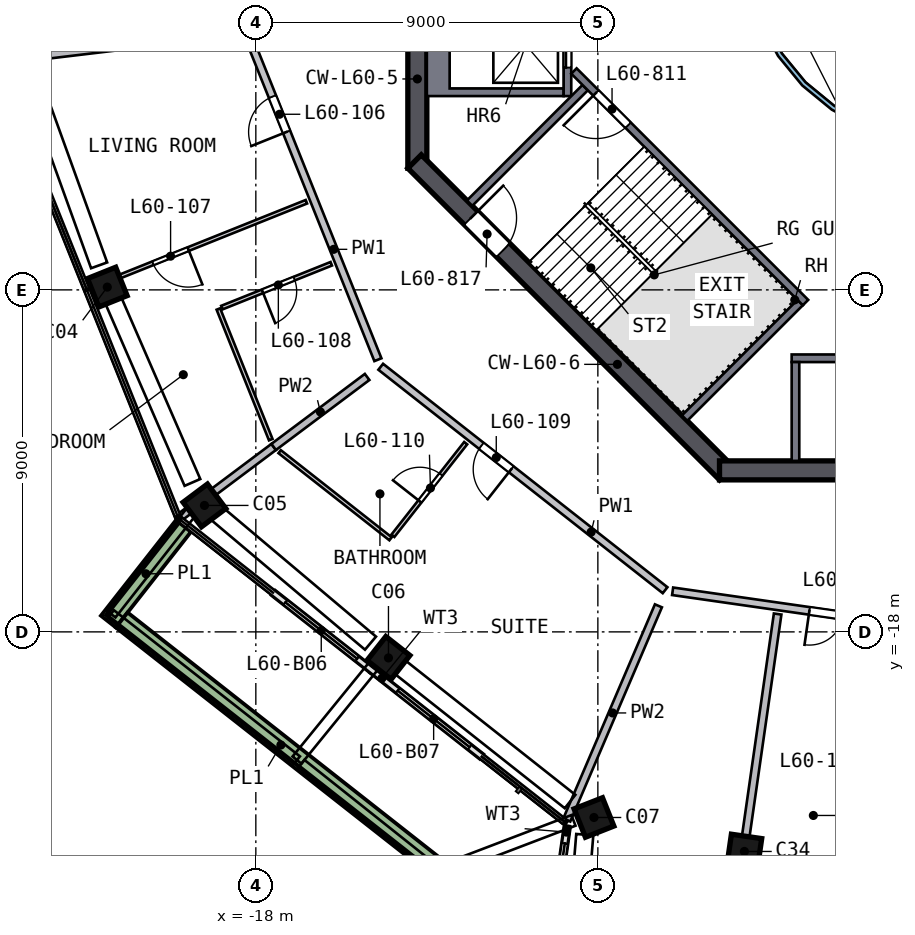
"""IFC4 building model, lengths in metres.
Left out: names, types, materials, properties, quantities, classifications, styles, units other than length and angle.
Written with IfcOpenShell. Run it as: python <this file> out.ifc"""

import sys

from ifc_helpers import new_model, si_unit, direction, frame, frame_2d, origin, origin_2d, place, context, subcontext, project, spatial, polyline, rectangle, outline, extrude, element, fill, save


model = new_model("IFC4")
c1 = context("Model", 3, precision=1e-05, world=origin(), true_north=direction((0.0, 1.0)))
c2 = subcontext(c1, "Body", "Model", "MODEL_VIEW")
j1 = project(units=[si_unit("LENGTHUNIT", "METRE"), si_unit("PLANEANGLEUNIT", "RADIAN")], contexts=[c1])
p1 = place(None, origin())
s1 = spatial("IfcSite", under=j1, at=p1, CompositionType="ELEMENT")
p2 = place(p1, origin())
s2 = spatial("IfcBuilding", under=s1, at=p2, CompositionType="ELEMENT")
p3 = place(p2, frame((0.0, 0.0, 244.5)))
s3 = spatial("IfcBuildingStorey", under=s2, at=p3, CompositionType="ELEMENT", Elevation=244.5)
p4 = place(p3, frame((-21.96, -8.801, 0.0), z_axis=(0.042739143, -0.104110118, 0.993647044), x_axis=(0.369538016, -0.922375739, -0.11253733)))
e1 = element("IfcColumn", 1, at=p4, inside=s3, PredefinedType="COLUMN", context=c2, shape_type="SweptSolid", body=[
    extrude(rectangle(XDim=0.8, YDim=0.8, at=origin_2d()), origin(), (0.0, 0.0, 1.0), 3.21),
])
p5 = place(p3, frame((-19.436, -14.561, 0.0), z_axis=(0.070016696, -0.091835145, 0.993309604), x_axis=(-0.595516736, 0.794999833, 0.11547763)))
e2 = element("IfcColumn", 2, at=p5, inside=s3, PredefinedType="COLUMN", context=c2, shape_type="SweptSolid", body=[
    extrude(rectangle(XDim=0.8, YDim=0.8, at=origin_2d()), origin(), (0.0, 0.0, 1.0), 3.211),
])
p6 = place(p3, frame((-14.617, -18.602, 0.0), z_axis=(0.089052954, -0.068747968, 0.993651492), x_axis=(0.781361755, -0.613855028, -0.112498053)))
e3 = element("IfcColumn", 3, at=p6, inside=s3, PredefinedType="COLUMN", context=c2, shape_type="SweptSolid", body=[
    extrude(rectangle(XDim=0.8, YDim=0.8, at=origin_2d()), origin(), (0.0, 0.0, 1.0), 3.21),
])
p7 = place(p3, frame((-9.234, -22.833, 0.0), z_axis=(0.108919678, -0.042944605, 0.993122482), x_axis=(-0.364795572, 0.92763396, 0.080121326)))
e4 = element("IfcColumn", 4, at=p7, inside=s3, PredefinedType="COLUMN", context=c2, shape_type="SweptSolid", body=[
    extrude(rectangle(XDim=0.8, YDim=0.8, at=origin_2d()), origin(), (0.0, 0.0, 1.0), 3.212),
])
p8 = place(p3, frame((-5.281, -23.749, 0.0), z_axis=(0.113118899, -0.024174603, 0.993287322), x_axis=(-0.142952764, -0.989698718, -0.007807323)))
e5 = element("IfcColumn", 5, at=p8, inside=s3, PredefinedType="COLUMN", context=c2, shape_type="SweptSolid", body=[
    extrude(rectangle(XDim=0.8, YDim=0.8, at=origin_2d()), origin(), (0.0, 0.0, 1.0), 3.211),
])
p9 = place(p3, frame((-13.75, 5.799, 0.0), z_axis=(0.0, 0.0, 1.0), x_axis=(0.0, -1.0, 0.0)))
e6 = element("IfcWall", 6, at=p9, inside=s3, PredefinedType="SHEAR", context=c2, shape_type="SweptSolid", body=[
    extrude(rectangle(XDim=11.598, YDim=0.5, at=frame_2d((5.799, 0.0))), origin(), (0.0, 0.0, 1.0), 3.5),
])
p10 = place(p9, frame((4.899, 0.0, 0.0)))
e7 = element("IfcOpeningElement", 7, at=p10, cuts=e6, PredefinedType="OPENING", context=c2, shape_type="SweptSolid", body=[
    extrude(rectangle(XDim=1.8, YDim=2.1, at=frame_2d((0.9, 1.05))), frame((0.0, 0.26, 0.0), z_axis=(0.0, -1.0, 0.0), x_axis=(1.0, 0.0, 0.0)), (0.0, 0.0, 1.0), 0.52),
])
p11 = place(p3, frame((-13.823, -5.622, 0.0), z_axis=(0.0, 0.0, 1.0), x_axis=(0.707106781, -0.707106781, 0.0)))
e8 = element("IfcWall", 8, at=p11, inside=s3, PredefinedType="SHEAR", context=c2, shape_type="SweptSolid", body=[
    extrude(rectangle(XDim=11.598, YDim=0.5, at=frame_2d((5.799, 0.0))), origin(), (0.0, 0.0, 1.0), 3.5),
])
p12 = place(p11, frame((2.099, 0.0, 0.0)))
e9 = element("IfcOpeningElement", 9, at=p12, cuts=e8, PredefinedType="OPENING", context=c2, shape_type="SweptSolid", body=[
    extrude(rectangle(XDim=1.2, YDim=2.1, at=frame_2d((0.6, 1.05))), frame((0.0, 0.26, 0.0), z_axis=(0.0, -1.0, 0.0), x_axis=(1.0, 0.0, 0.0)), (0.0, 0.0, 1.0), 0.52),
])
p13 = place(p3, frame((-5.799, -13.75, 0.0), z_axis=(0.0, 0.0, 1.0), x_axis=(1.0, 0.0, 0.0)))
e10 = element("IfcWall", 10, at=p13, inside=s3, PredefinedType="SHEAR", context=c2, shape_type="SweptSolid", body=[
    extrude(rectangle(XDim=11.598, YDim=0.5, at=frame_2d((5.799, 0.0))), origin(), (0.0, 0.0, 1.0), 3.5),
])
p14 = place(p3, frame((-17.537, -16.976, 0.0), z_axis=(0.0, 0.0, 1.0), x_axis=(0.786266993, -0.617886896, 0.0)))
e11 = element("IfcWall", 11, at=p14, inside=s3, PredefinedType="SOLIDWALL", context=c2, shape_type="SweptSolid", body=[
    extrude(rectangle(XDim=3.3, YDim=0.15, at=frame_2d((1.65, 0.0))), origin(), (0.0, 0.0, 1.0), 2.525),
])
p15 = place(p14, frame((0.4, 0.0, 0.0)))
e12 = element("IfcOpeningElement", 12, at=p15, cuts=e11, PredefinedType="OPENING", context=c2, shape_type="SweptSolid", body=[
    extrude(rectangle(XDim=2.4, YDim=2.4, at=frame_2d((1.2, 1.2))), frame((0.0, 0.085, 0.0), z_axis=(0.0, -1.0, 0.0), x_axis=(1.0, 0.0, 0.0)), (0.0, 0.0, 1.0), 0.17),
])
p16 = place(p3, frame((-14.942, -19.015, 0.0), z_axis=(0.0, 0.0, 1.0), x_axis=(0.786290572, -0.61785689, 0.0)))
e13 = element("IfcWall", 13, at=p16, inside=s3, PredefinedType="SOLIDWALL", context=c2, shape_type="SweptSolid", body=[
    extrude(rectangle(XDim=3.661, YDim=0.15, at=frame_2d((1.831, 0.0))), origin(), (0.0, 0.0, 1.0), 2.525),
])
p17 = place(p16, frame((0.861, 0.0, 0.0)))
e14 = element("IfcOpeningElement", 14, at=p17, cuts=e13, PredefinedType="OPENING", context=c2, shape_type="SweptSolid", body=[
    extrude(rectangle(XDim=2.4, YDim=2.4, at=frame_2d((1.2, 1.2))), frame((0.0, 0.085, 0.0), z_axis=(0.0, -1.0, 0.0), x_axis=(1.0, 0.0, 0.0)), (0.0, 0.0, 1.0), 0.17),
])
p18 = place(p3, frame((-9.813, -23.17, 0.0), z_axis=(0.0, 0.0, 1.0), x_axis=(-0.141987452, -0.989868458, 0.0)))
e15 = element("IfcWall", 15, at=p18, inside=s3, PredefinedType="SOLIDWALL", context=c2, shape_type="SweptSolid", body=[
    extrude(rectangle(XDim=3.2, YDim=0.15, at=frame_2d((1.6, 0.0))), origin(), (0.0, 0.0, 1.0), 2.525),
])
p19 = place(p18, frame((0.4, 0.0, 0.0)))
e16 = element("IfcOpeningElement", 16, at=p19, cuts=e15, PredefinedType="OPENING", context=c2, shape_type="SweptSolid", body=[
    extrude(rectangle(XDim=2.4, YDim=2.4, at=frame_2d((1.2, 1.2))), frame((0.0, 0.085, 0.0), z_axis=(0.0, -1.0, 0.0), x_axis=(1.0, 0.0, 0.0)), (0.0, 0.0, 1.0), 0.17),
])
p20 = place(p3, frame((-19.903, -15.213, 0.0), z_axis=(0.0, 0.0, 1.0), x_axis=(-0.617858626, -0.786289208, 0.0)))
e17 = element("IfcWall", 17, at=p20, inside=s3, PredefinedType="SOLIDWALL", context=c2, shape_type="SweptSolid", body=[
    extrude(rectangle(XDim=3.199, YDim=0.5, at=frame_2d((1.6, 0.0))), origin(), (0.0, 0.0, 1.0), 0.7),
])
p21 = place(p3, frame((-21.529, -17.687, 0.0), z_axis=(0.0, 0.0, 1.0), x_axis=(0.786290502, -0.617856979, 0.0)))
e18 = element("IfcWall", 18, at=p21, inside=s3, PredefinedType="SOLIDWALL", context=c2, shape_type="SweptSolid", body=[
    extrude(rectangle(XDim=10.652, YDim=0.5, at=frame_2d((5.326, 0.0))), origin(), (0.0, 0.0, 1.0), 0.7),
])
p22 = place(p3, origin())
e19 = element("IfcWall", 19, at=p22, inside=s3, PredefinedType="SOLIDWALL", context=c2, shape_type="SweptSolid", body=[
    extrude(outline(polyline([(-13.5, -3.9), (-13.5, -1.2), (-9.9, -1.2), (-9.9, -1.4), (-12.9, -1.4), (-12.9, -3.7), (-9.9, -3.7), (-9.9, -3.9), (-13.5, -3.9)])), origin(), (0.0, 0.0, 1.0), 3.19),
])
p23 = place(p3, frame((-9.8, -1.2, 0.0), z_axis=(0.0, 0.0, 1.0), x_axis=(0.0, -1.0, 0.0)))
e20 = element("IfcWall", 20, at=p23, inside=s3, PredefinedType="SOLIDWALL", context=c2, shape_type="SweptSolid", body=[
    extrude(rectangle(XDim=2.7, YDim=0.2, at=frame_2d((1.35, 0.0))), origin(), (0.0, 0.0, 1.0), 3.19),
])
p24 = place(p23, frame((0.75, 0.0, 0.0)))
e21 = element("IfcOpeningElement", 21, at=p24, cuts=e20, PredefinedType="OPENING", context=c2, shape_type="SweptSolid", body=[
    extrude(rectangle(XDim=1.2, YDim=2.1, at=frame_2d((0.6, 1.05))), frame((0.0, 0.11, 0.0), z_axis=(0.0, -1.0, 0.0), x_axis=(1.0, 0.0, 0.0)), (0.0, 0.0, 1.0), 0.22),
])
p25 = place(p3, frame((-3.9, -10.8, 0.0), z_axis=(0.0, 0.0, 1.0), x_axis=(1.0, 0.0, 0.0)))
e22 = element("IfcWall", 22, at=p25, inside=s3, PredefinedType="SOLIDWALL", context=c2, shape_type="SweptSolid", body=[
    extrude(rectangle(XDim=7.8, YDim=0.2, at=frame_2d((3.9, 0.0))), origin(), (0.0, 0.0, 1.0), 3.19),
])
p26 = place(p25, frame((3.45, 0.0, 0.0)))
e23 = element("IfcOpeningElement", 23, at=p26, cuts=e22, PredefinedType="OPENING", context=c2, shape_type="SweptSolid", body=[
    extrude(rectangle(XDim=0.9, YDim=2.1, at=frame_2d((0.45, 1.05))), frame((0.0, 0.11, 0.0), z_axis=(0.0, -1.0, 0.0), x_axis=(1.0, 0.0, 0.0)), (0.0, 0.0, 1.0), 0.22),
])
p27 = place(p3, frame((-3.8, -10.9, 0.0), z_axis=(0.0, 0.0, 1.0), x_axis=(0.0, -1.0, 0.0)))
e24 = element("IfcWall", 24, at=p27, inside=s3, PredefinedType="SOLIDWALL", context=c2, shape_type="SweptSolid", body=[
    extrude(rectangle(XDim=2.6, YDim=0.2, at=frame_2d((1.3, 0.0))), origin(), (0.0, 0.0, 1.0), 3.19),
])
p28 = place(p3, frame((-3.535, -9.334, 0.0), z_axis=(0.0, 0.0, 1.0), x_axis=(-0.707120946, 0.707092617, 0.0)))
e25 = element("IfcWall", 25, at=p28, inside=s3, PredefinedType="SOLIDWALL", context=c2, shape_type="SweptSolid", body=[
    extrude(rectangle(XDim=8.618, YDim=0.2, at=frame_2d((4.309, 0.0))), origin(), (0.0, 0.0, 1.0), 3.19),
])
p29 = place(p28, frame((6.6, 0.0, 0.0)))
e26 = element("IfcOpeningElement", 26, at=p29, cuts=e25, PredefinedType="OPENING", context=c2, shape_type="SweptSolid", body=[
    extrude(rectangle(XDim=1.2, YDim=2.1, at=frame_2d((0.6, 1.05))), frame((0.0, 0.11, 0.0), z_axis=(0.0, -1.0, 0.0), x_axis=(1.0, 0.0, 0.0)), (0.0, 0.0, 1.0), 0.22),
])
for number, where, z_axis, x_axis in (
    (27, (-9.334, -3.677, 0.0), (0.0, 0.0, 1.0), (-0.707, -0.707, 0.0)),
    (28, (-3.677, -9.334, 0.0), (0.0, 0.0, 1.0), (-0.707, -0.707, 0.0)),
):
    element("IfcWall", number, at=place(p3, frame(where, z_axis=z_axis, x_axis=x_axis)), inside=s3, PredefinedType="SOLIDWALL", context=c2, shape_type="SweptSolid", body=[
        extrude(rectangle(XDim=4.3, YDim=0.2, at=frame_2d((2.15, 0.0))), origin(), (0.0, 0.0, 1.0), 3.19),
    ])
p30 = place(p3, origin())
e29 = element("IfcWall", 29, at=p30, inside=s3, PredefinedType="SOLIDWALL", context=c2, shape_type="SweptSolid", body=[
    extrude(outline(polyline([(5.021, -0.999), (4.73, -1.959), (4.257, -2.844), (3.62, -3.62), (2.844, -4.257), (1.959, -4.73), (0.999, -5.021), (0.0, -5.12), (-0.999, -5.021), (-1.959, -4.73), (-2.844, -4.257), (-3.62, -3.62), (-4.257, -2.844), (-4.73, -1.959), (-5.021, -0.999), (-5.12, 0.0), (-5.021, 0.999), (-4.73, 1.959), (-4.257, 2.844), (-3.62, 3.62), (-2.844, 4.257), (-1.959, 4.73), (-0.999, 5.021), (0.0, 5.12), (0.999, 5.021), (1.959, 4.73), (2.844, 4.257), (3.62, 3.62), (4.257, 2.844), (4.73, 1.959), (5.021, 0.999), (5.12, 0.0), (5.021, -0.999)]), holes=[polyline([(4.904, 0.976), (4.619, 1.913), (4.157, 2.778), (3.535, 3.535), (2.778, 4.157), (1.913, 4.619), (0.976, 4.904), (0.0, 5.0), (-0.976, 4.904), (-1.913, 4.619), (-2.778, 4.157), (-3.535, 3.535), (-4.157, 2.778), (-4.619, 1.913), (-4.904, 0.976), (-5.0, 0.0), (-4.904, -0.976), (-4.619, -1.913), (-4.157, -2.778), (-3.535, -3.535), (-2.778, -4.157), (-1.913, -4.619), (-0.976, -4.904), (0.0, -5.0), (0.976, -4.904), (1.913, -4.619), (2.778, -4.157), (3.535, -3.535), (4.157, -2.778), (4.619, -1.913), (4.904, -0.976), (5.0, 0.0), (4.904, 0.976)])]), origin(), (0.0, 0.0, 1.0), 3.19),
])
p31 = place(p3, frame((-14.788, -10.837, 0.0), z_axis=(0.0, 0.0, 1.0), x_axis=(-0.372004694, 0.928230848, 0.0)))
e30 = element("IfcWall", 30, at=p31, inside=s3, PredefinedType="SOLIDWALL", context=c2, shape_type="SweptSolid", body=[
    extrude(rectangle(XDim=9.116, YDim=0.2, at=frame_2d((4.558, 0.0))), origin(), (0.0, 0.0, 1.0), 3.19),
])
p32 = place(p31, frame((6.458, 0.0, 0.0)))
e31 = element("IfcOpeningElement", 31, at=p32, cuts=e30, PredefinedType="OPENING", context=c2, shape_type="SweptSolid", body=[
    extrude(rectangle(XDim=1.0, YDim=2.1, at=frame_2d((0.5, 1.05))), frame((0.0, 0.11, 0.0), z_axis=(0.0, -1.0, 0.0), x_axis=(1.0, 0.0, 0.0)), (0.0, 0.0, 1.0), 0.22),
])
p33 = place(p3, frame((-7.231, -16.903, 0.0), z_axis=(0.0, 0.0, 1.0), x_axis=(-0.7862854, 0.617863472, 0.0)))
e32 = element("IfcWall", 32, at=p33, inside=s3, PredefinedType="SOLIDWALL", context=c2, shape_type="SweptSolid", body=[
    extrude(rectangle(XDim=9.516, YDim=0.2, at=frame_2d((4.758, 0.0))), origin(), (0.0, 0.0, 1.0), 3.19),
])
p34 = place(p33, frame((5.15, 0.0, 0.0)))
e33 = element("IfcOpeningElement", 33, at=p34, cuts=e32, PredefinedType="OPENING", context=c2, shape_type="SweptSolid", body=[
    extrude(rectangle(XDim=1.0, YDim=2.1, at=frame_2d((0.5, 1.05))), frame((0.0, 0.11, 0.0), z_axis=(0.0, -1.0, 0.0), x_axis=(1.0, 0.0, 0.0)), (0.0, 0.0, 1.0), 0.22),
])
p35 = place(p3, frame((2.19, -18.254, 0.0), z_axis=(0.0, 0.0, 1.0), x_axis=(-0.989873884, 0.141949618, 0.0)))
e34 = element("IfcWall", 34, at=p35, inside=s3, PredefinedType="SOLIDWALL", context=c2, shape_type="SweptSolid", body=[
    extrude(rectangle(XDim=9.317, YDim=0.2, at=frame_2d((4.658, 0.0))), origin(), (0.0, 0.0, 1.0), 3.19),
])
p36 = place(p35, frame((3.881, 0.0, 0.0)))
e35 = element("IfcOpeningElement", 35, at=p36, cuts=e34, PredefinedType="OPENING", context=c2, shape_type="SweptSolid", body=[
    extrude(rectangle(XDim=1.8, YDim=2.1, at=frame_2d((0.9, 1.05))), frame((0.0, 0.11, 0.0), z_axis=(0.0, -1.0, 0.0), x_axis=(1.0, 0.0, 0.0)), (0.0, 0.0, 1.0), 0.22),
])
p37 = place(p3, frame((-18.698, -2.243, 0.0), z_axis=(0.0, 0.0, 1.0), x_axis=(-0.992884184, -0.119083992, 0.0)))
e36 = element("IfcWall", 36, at=p37, inside=s3, PredefinedType="SOLIDWALL", context=c2, shape_type="SweptSolid", body=[
    extrude(rectangle(XDim=6.132, YDim=0.2, at=frame_2d((3.066, 0.0))), origin(), (0.0, 0.0, 1.0), 3.19),
])
p38 = place(p3, frame((-17.531, -13.134, 0.0), z_axis=(0.0, 0.0, 1.0), x_axis=(-0.800335044, -0.599553015, 0.0)))
e37 = element("IfcWall", 37, at=p38, inside=s3, PredefinedType="SOLIDWALL", context=c2, shape_type="SweptSolid", body=[
    extrude(rectangle(XDim=3.059, YDim=0.2, at=frame_2d((1.53, 0.0))), origin(), (0.0, 0.0, 1.0), 3.19),
])
p39 = place(p3, frame((-15.072, -11.291, 0.0), z_axis=(0.0, 0.0, 1.0), x_axis=(-0.800266888, -0.599643984, 0.0)))
e38 = element("IfcWall", 38, at=p39, inside=s3, PredefinedType="SOLIDWALL", context=c2, shape_type="SweptSolid", body=[
    extrude(rectangle(XDim=3.073, YDim=0.2, at=frame_2d((1.536, 0.0))), origin(), (0.0, 0.0, 1.0), 3.19),
])
p40 = place(p3, frame((-9.818, -22.952, 0.0), z_axis=(0.0, 0.0, 1.0), x_axis=(0.393313779, 0.919404302, 0.0)))
e39 = element("IfcWall", 39, at=p40, inside=s3, PredefinedType="SOLIDWALL", context=c2, shape_type="SweptSolid", body=[
    extrude(rectangle(XDim=6.132, YDim=0.2, at=frame_2d((3.066, 0.0))), origin(), (0.0, 0.0, 1.0), 3.19),
])
p41 = place(p3, frame((-5.732, -27.728, 0.0), z_axis=(0.0, 0.0, 1.0), x_axis=(0.141952175, 0.989873517, 0.0)))
e40 = element("IfcWall", 40, at=p41, inside=s3, PredefinedType="SOLIDWALL", context=c2, shape_type="SweptSolid", body=[
    extrude(rectangle(XDim=10.302, YDim=0.2, at=frame_2d((5.151, 0.0))), origin(), (0.0, 0.0, 1.0), 3.19),
])
p42 = place(p41, frame((2.5, 0.0, 0.0)))
e41 = element("IfcOpeningElement", 41, at=p42, cuts=e40, PredefinedType="OPENING", context=c2, shape_type="SweptSolid", body=[
    extrude(rectangle(XDim=1.0, YDim=2.1, at=frame_2d((0.5, 1.05))), frame((0.0, 0.11, 0.0), z_axis=(0.0, -1.0, 0.0), x_axis=(1.0, 0.0, 0.0)), (0.0, 0.0, 1.0), 0.22),
])
p43 = place(p3, frame((-16.669, -6.681, 0.0), z_axis=(0.0, 0.0, 1.0), x_axis=(-0.92822734, -0.372013447, 0.0)))
e42 = element("IfcWall", 42, at=p43, inside=s3, PredefinedType="PARTITIONING", context=c2, shape_type="SweptSolid", body=[
    extrude(rectangle(XDim=6.15, YDim=0.1, at=frame_2d((3.075, 0.0))), origin(), (0.0, 0.0, 1.0), 3.19),
])
p44 = place(p43, frame((3.35, 0.0, 0.0)))
e43 = element("IfcOpeningElement", 43, at=p44, cuts=e42, PredefinedType="OPENING", context=c2, shape_type="SweptSolid", body=[
    extrude(rectangle(XDim=1.0, YDim=2.1, at=frame_2d((0.5, 1.05))), frame((0.0, 0.06, 0.0), z_axis=(0.0, -1.0, 0.0), x_axis=(1.0, 0.0, 0.0)), (0.0, 0.0, 1.0), 0.12),
])
p45 = place(p3, frame((-18.986, -9.503, 0.0), z_axis=(0.0, 0.0, 1.0), x_axis=(0.372027015, -0.928221903, 0.0)))
e44 = element("IfcWall", 44, at=p45, inside=s3, PredefinedType="PARTITIONING", context=c2, shape_type="SweptSolid", body=[
    extrude(rectangle(XDim=3.704, YDim=0.1, at=frame_2d((1.852, 0.0))), origin(), (0.0, 0.0, 1.0), 3.19),
])
p46 = place(p3, frame((-16.015, -8.313, 0.0), z_axis=(0.0, 0.0, 1.0), x_axis=(-0.928215753, -0.372042357, 0.0)))
e45 = element("IfcWall", 45, at=p46, inside=s3, PredefinedType="PARTITIONING", context=c2, shape_type="SweptSolid", body=[
    extrude(rectangle(XDim=3.1, YDim=0.1, at=frame_2d((1.55, 0.0))), origin(), (0.0, 0.0, 1.0), 3.19),
])
p47 = place(p46, frame((1.05, 0.0, 0.0)))
e46 = element("IfcOpeningElement", 46, at=p47, cuts=e45, PredefinedType="OPENING", context=c2, shape_type="SweptSolid", body=[
    extrude(rectangle(XDim=0.9, YDim=2.1, at=frame_2d((0.45, 1.05))), frame((0.0, 0.06, 0.0), z_axis=(0.0, -1.0, 0.0), x_axis=(1.0, 0.0, 0.0)), (0.0, 0.0, 1.0), 0.12),
])
p48 = place(p3, frame((-14.455, -15.55, 0.0), z_axis=(0.0, 0.0, 1.0), x_axis=(-0.786313773, 0.617827363, 0.0)))
e47 = element("IfcWall", 47, at=p48, inside=s3, PredefinedType="PARTITIONING", context=c2, shape_type="SweptSolid", body=[
    extrude(rectangle(XDim=3.711, YDim=0.1, at=frame_2d((1.855, 0.0))), origin(), (0.0, 0.0, 1.0), 3.19),
])
p49 = place(p3, frame((-14.394, -15.471, 0.0), z_axis=(0.0, 0.0, 1.0), x_axis=(0.617842421, 0.786301941, 0.0)))
e48 = element("IfcWall", 48, at=p49, inside=s3, PredefinedType="PARTITIONING", context=c2, shape_type="SweptSolid", body=[
    extrude(rectangle(XDim=3.1, YDim=0.1, at=frame_2d((1.55, 0.0))), origin(), (0.0, 0.0, 1.0), 3.19),
])
p50 = place(p49, frame((1.15, 0.0, 0.0)))
e49 = element("IfcOpeningElement", 49, at=p50, cuts=e48, PredefinedType="OPENING", context=c2, shape_type="SweptSolid", body=[
    extrude(rectangle(XDim=0.9, YDim=2.1, at=frame_2d((0.45, 1.05))), frame((0.0, 0.06, 0.0), z_axis=(0.0, -1.0, 0.0), x_axis=(1.0, 0.0, 0.0)), (0.0, 0.0, 1.0), 0.12),
])
p51 = place(p15, origin())
e50 = element("IfcDoor", 50, at=p51, inside=s3, OperationType="SLIDING_TO_RIGHT", PredefinedType="DOOR", context=c2, shape_type="SweptSolid", body=[
    extrude(rectangle(XDim=2.4, YDim=2.4, at=frame_2d((1.2, 1.2))), frame((0.0, 0.025, 0.0), z_axis=(0.0, -1.0, 0.0), x_axis=(1.0, 0.0, 0.0)), (0.0, 0.0, 1.0), 0.05),
])
fill(e12, e50)
p52 = place(p17, origin())
e51 = element("IfcDoor", 51, at=p52, inside=s3, OperationType="SLIDING_TO_LEFT", PredefinedType="DOOR", context=c2, shape_type="SweptSolid", body=[
    extrude(rectangle(XDim=2.4, YDim=2.4, at=frame_2d((1.2, 1.2))), frame((0.0, 0.025, 0.0), z_axis=(0.0, -1.0, 0.0), x_axis=(1.0, 0.0, 0.0)), (0.0, 0.0, 1.0), 0.05),
])
fill(e14, e51)
p53 = place(p19, origin())
e52 = element("IfcDoor", 52, at=p53, inside=s3, OperationType="SLIDING_TO_LEFT", PredefinedType="DOOR", context=c2, shape_type="SweptSolid", body=[
    extrude(rectangle(XDim=2.4, YDim=2.4, at=frame_2d((1.2, 1.2))), frame((0.0, 0.025, 0.0), z_axis=(0.0, -1.0, 0.0), x_axis=(1.0, 0.0, 0.0)), (0.0, 0.0, 1.0), 0.05),
])
fill(e16, e52)
p54 = place(p24, origin())
e53 = element("IfcDoor", 53, at=p54, inside=s3, OperationType="DOUBLE_DOOR_SLIDING", PredefinedType="DOOR", context=c2, shape_type="SweptSolid", body=[
    extrude(rectangle(XDim=1.2, YDim=2.1, at=frame_2d((0.6, 1.05))), frame((0.0, 0.025, 0.0), z_axis=(0.0, -1.0, 0.0), x_axis=(1.0, 0.0, 0.0)), (0.0, 0.0, 1.0), 0.05),
])
fill(e21, e53)
p55 = place(p29, origin())
e54 = element("IfcDoor", 54, at=p55, inside=s3, OperationType="SINGLE_SWING_RIGHT", PredefinedType="DOOR", context=c2, shape_type="SweptSolid", body=[
    extrude(rectangle(XDim=1.2, YDim=2.1, at=frame_2d((0.6, 1.05))), frame((0.0, 0.025, 0.0), z_axis=(0.0, -1.0, 0.0), x_axis=(1.0, 0.0, 0.0)), (0.0, 0.0, 1.0), 0.05),
])
fill(e26, e54)
p56 = place(p12, origin())
e55 = element("IfcDoor", 55, at=p56, inside=s3, OperationType="SINGLE_SWING_LEFT", PredefinedType="DOOR", context=c2, shape_type="SweptSolid", body=[
    extrude(rectangle(XDim=1.2, YDim=2.1, at=frame_2d((0.6, 1.05))), frame((0.0, 0.025, 0.0), z_axis=(0.0, -1.0, 0.0), x_axis=(1.0, 0.0, 0.0)), (0.0, 0.0, 1.0), 0.05),
])
fill(e9, e55)
p57 = place(p32, origin())
e56 = element("IfcDoor", 56, at=p57, inside=s3, OperationType="SINGLE_SWING_LEFT", PredefinedType="DOOR", context=c2, shape_type="SweptSolid", body=[
    extrude(rectangle(XDim=1.0, YDim=2.1, at=frame_2d((0.5, 1.05))), frame((0.0, 0.025, 0.0), z_axis=(0.0, -1.0, 0.0), x_axis=(1.0, 0.0, 0.0)), (0.0, 0.0, 1.0), 0.05),
])
fill(e31, e56)
p58 = place(p44, origin())
e57 = element("IfcDoor", 57, at=p58, inside=s3, OperationType="SINGLE_SWING_LEFT", PredefinedType="DOOR", context=c2, shape_type="SweptSolid", body=[
    extrude(rectangle(XDim=1.0, YDim=2.1, at=frame_2d((0.5, 1.05))), frame((0.0, 0.025, 0.0), z_axis=(0.0, -1.0, 0.0), x_axis=(1.0, 0.0, 0.0)), (0.0, 0.0, 1.0), 0.05),
])
fill(e43, e57)
p59 = place(p47, origin())
e58 = element("IfcDoor", 58, at=p59, inside=s3, OperationType="SINGLE_SWING_RIGHT", PredefinedType="DOOR", context=c2, shape_type="SweptSolid", body=[
    extrude(rectangle(XDim=0.9, YDim=2.1, at=frame_2d((0.45, 1.05))), frame((0.0, 0.025, 0.0), z_axis=(0.0, -1.0, 0.0), x_axis=(1.0, 0.0, 0.0)), (0.0, 0.0, 1.0), 0.05),
])
fill(e46, e58)
p60 = place(p34, origin())
e59 = element("IfcDoor", 59, at=p60, inside=s3, OperationType="SINGLE_SWING_LEFT", PredefinedType="DOOR", context=c2, shape_type="SweptSolid", body=[
    extrude(rectangle(XDim=1.0, YDim=2.1, at=frame_2d((0.5, 1.05))), frame((0.0, 0.025, 0.0), z_axis=(0.0, -1.0, 0.0), x_axis=(1.0, 0.0, 0.0)), (0.0, 0.0, 1.0), 0.05),
])
fill(e33, e59)
p61 = place(p50, origin())
e60 = element("IfcDoor", 60, at=p61, inside=s3, OperationType="SINGLE_SWING_LEFT", PredefinedType="DOOR", context=c2, shape_type="SweptSolid", body=[
    extrude(rectangle(XDim=0.9, YDim=2.1, at=frame_2d((0.45, 1.05))), frame((0.0, 0.025, 0.0), z_axis=(0.0, -1.0, 0.0), x_axis=(1.0, 0.0, 0.0)), (0.0, 0.0, 1.0), 0.05),
])
fill(e49, e60)
p62 = place(p36, origin())
e61 = element("IfcDoor", 61, at=p62, inside=s3, OperationType="DOUBLE_DOOR_SINGLE_SWING", PredefinedType="DOOR", context=c2, shape_type="SweptSolid", body=[
    extrude(rectangle(XDim=1.8, YDim=2.1, at=frame_2d((0.9, 1.05))), frame((0.0, 0.025, 0.0), z_axis=(0.0, -1.0, 0.0), x_axis=(1.0, 0.0, 0.0)), (0.0, 0.0, 1.0), 0.05),
])
fill(e35, e61)
save(model, sys.argv[1])
